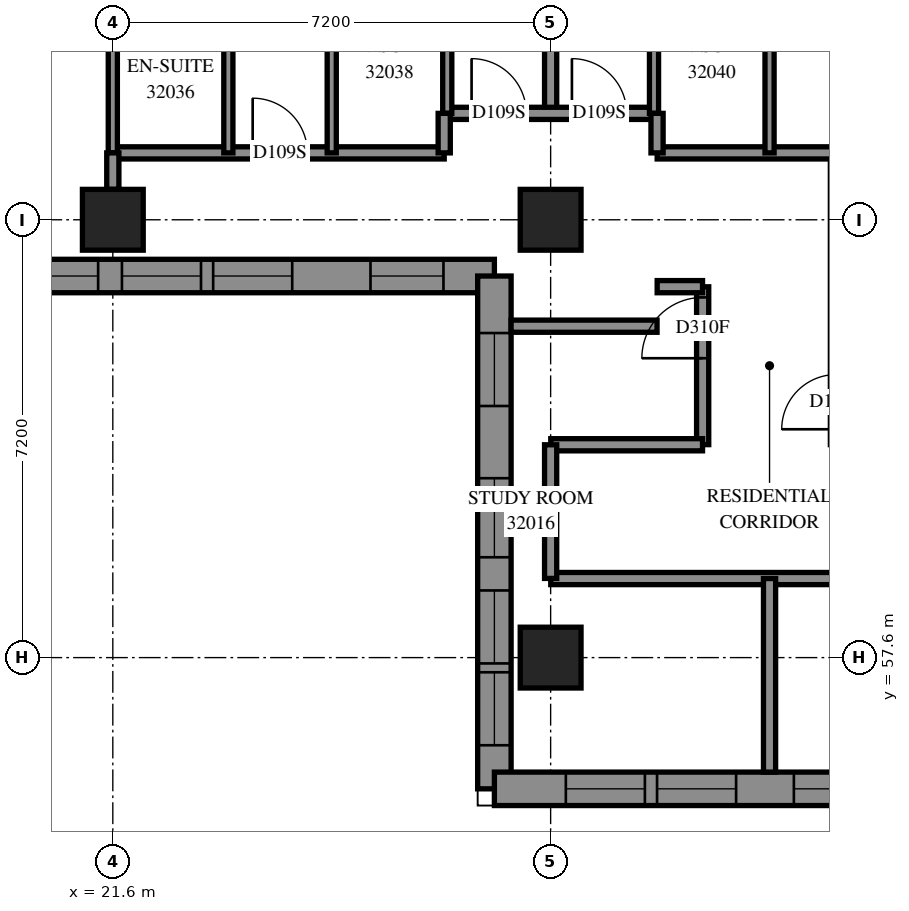
"""IFC4 building model, lengths in metres.
Left out: names, types, materials, properties, quantities, classifications, styles, units other than length and angle.
Written with IfcOpenShell. Run it as: python <this file> out.ifc"""

import sys

from ifc_helpers import new_model, si_unit, direction, frame, frame_2d, origin, origin_2d, place, context, subcontext, project, spatial, polyline, rectangle, outline, extrude, element, fill, save


model = new_model("IFC4")
c1 = context("Model", 3, precision=1e-05, world=origin(), true_north=direction((0.0, 1.0)))
c2 = subcontext(c1, "Body", "Model", "MODEL_VIEW")
j1 = project(units=[si_unit("LENGTHUNIT", "METRE"), si_unit("PLANEANGLEUNIT", "RADIAN")], contexts=[c1])
p1 = place(None, origin())
s1 = spatial("IfcSite", under=j1, at=p1, CompositionType="ELEMENT")
p2 = place(p1, origin())
s2 = spatial("IfcBuilding", under=s1, at=p2, CompositionType="ELEMENT")
p3 = place(p2, frame((0.0, 0.0, 118.6)))
s3 = spatial("IfcBuildingStorey", under=s2, at=p3, CompositionType="ELEMENT", Elevation=118.6)
for number, where, z_axis, x_axis in (
    (1, (21.6, 64.8, 0.0), (0.0, 0.0, 1.0), (1.0, 0.0, 0.0)),
    (2, (28.8, 57.6, 0.0), (0.0, 0.0, 1.0), (1.0, 0.0, 0.0)),
    (3, (28.8, 64.8, 0.0), (0.0, 0.0, 1.0), (1.0, 0.0, 0.0)),
):
    element("IfcColumn", number, at=place(p3, frame(where, z_axis=z_axis, x_axis=x_axis)), inside=s3, PredefinedType="COLUMN", context=c2, shape_type="SweptSolid", body=[
        extrude(rectangle(XDim=1.0, YDim=1.0, at=origin_2d()), origin(), (0.0, 0.0, 1.0), 3.1),
    ])
p4 = place(p3, frame((19.442, 63.875, 0.0), z_axis=(0.0, 0.0, 1.0), x_axis=(1.0, 0.0, 0.0)))
e4 = element("IfcWall", 4, at=p4, inside=s3, PredefinedType="SOLIDWALL", context=c2, shape_type="SweptSolid", body=[
    extrude(outline(polyline([(-0.275, -0.275), (8.158, -0.275), (8.708, 0.275), (0.275, 0.275), (-0.275, -0.275)])), origin(), (0.0, 0.0, 1.0), 3.1),
])
p5 = place(p4, frame((2.308, 0.0, 0.5)))
e5 = element("IfcOpeningElement", 5, at=p5, cuts=e4, PredefinedType="OPENING", context=c2, shape_type="SweptSolid", body=[
    extrude(rectangle(XDim=1.3, YDim=2.45, at=frame_2d((0.65, 1.225))), frame((0.0, 0.285, 0.0), z_axis=(0.0, -1.0, 0.0), x_axis=(1.0, 0.0, 0.0)), (0.0, 0.0, 1.0), 0.57),
])
p6 = place(p4, frame((3.808, 0.0, 0.5)))
e6 = element("IfcOpeningElement", 6, at=p6, cuts=e4, PredefinedType="OPENING", context=c2, shape_type="SweptSolid", body=[
    extrude(rectangle(XDim=1.3, YDim=2.45, at=frame_2d((0.65, 1.225))), frame((0.0, 0.285, 0.0), z_axis=(0.0, -1.0, 0.0), x_axis=(1.0, 0.0, 0.0)), (0.0, 0.0, 1.0), 0.57),
])
p7 = place(p4, frame((0.717, 0.0, 0.5)))
e7 = element("IfcOpeningElement", 7, at=p7, cuts=e4, PredefinedType="OPENING", context=c2, shape_type="SweptSolid", body=[
    extrude(rectangle(XDim=1.2, YDim=2.45, at=frame_2d((0.6, 1.225))), frame((0.0, 0.285, 0.0), z_axis=(0.0, -1.0, 0.0), x_axis=(1.0, 0.0, 0.0)), (0.0, 0.0, 1.0), 0.57),
])
p8 = place(p4, frame((6.396, 0.0, 0.5)))
e8 = element("IfcOpeningElement", 8, at=p8, cuts=e4, PredefinedType="OPENING", context=c2, shape_type="SweptSolid", body=[
    extrude(rectangle(XDim=1.2, YDim=2.45, at=frame_2d((0.6, 1.225))), frame((0.0, 0.285, 0.0), z_axis=(0.0, -1.0, 0.0), x_axis=(1.0, 0.0, 0.0)), (0.0, 0.0, 1.0), 0.57),
])
p9 = place(p3, frame((27.875, 63.875, 0.0), z_axis=(0.0, 0.0, 1.0), x_axis=(0.0, -1.0, 0.0)))
e9 = element("IfcWall", 9, at=p9, inside=s3, PredefinedType="SOLIDWALL", context=c2, shape_type="SweptSolid", body=[
    extrude(outline(polyline([(0.275, -0.275), (8.708, -0.275), (8.158, 0.275), (-0.275, 0.275), (0.275, -0.275)])), origin(), (0.0, 0.0, 1.0), 3.1),
])
p10 = place(p9, frame((3.325, 0.0, 0.5)))
e10 = element("IfcOpeningElement", 10, at=p10, cuts=e9, PredefinedType="OPENING", context=c2, shape_type="SweptSolid", body=[
    extrude(rectangle(XDim=1.3, YDim=2.45, at=frame_2d((0.65, 1.225))), frame((0.0, 0.285, 0.0), z_axis=(0.0, -1.0, 0.0), x_axis=(1.0, 0.0, 0.0)), (0.0, 0.0, 1.0), 0.57),
])
p11 = place(p9, frame((0.938, 0.0, 0.5)))
e11 = element("IfcOpeningElement", 11, at=p11, cuts=e9, PredefinedType="OPENING", context=c2, shape_type="SweptSolid", body=[
    extrude(rectangle(XDim=1.2, YDim=2.45, at=frame_2d((0.6, 1.225))), frame((0.0, 0.285, 0.0), z_axis=(0.0, -1.0, 0.0), x_axis=(1.0, 0.0, 0.0)), (0.0, 0.0, 1.0), 0.57),
])
p12 = place(p9, frame((6.516, 0.0, 0.5)))
e12 = element("IfcOpeningElement", 12, at=p12, cuts=e9, PredefinedType="OPENING", context=c2, shape_type="SweptSolid", body=[
    extrude(rectangle(XDim=1.2, YDim=2.45, at=frame_2d((0.6, 1.225))), frame((0.0, 0.285, 0.0), z_axis=(0.0, -1.0, 0.0), x_axis=(1.0, 0.0, 0.0)), (0.0, 0.0, 1.0), 0.57),
])
p13 = place(p9, frame((5.171, 0.0, 0.5)))
e13 = element("IfcOpeningElement", 13, at=p13, cuts=e9, PredefinedType="OPENING", context=c2, shape_type="SweptSolid", body=[
    extrude(rectangle(XDim=1.2, YDim=2.45, at=frame_2d((0.6, 1.225))), frame((0.0, 0.285, 0.0), z_axis=(0.0, -1.0, 0.0), x_axis=(1.0, 0.0, 0.0)), (0.0, 0.0, 1.0), 0.57),
])
p14 = place(p3, frame((27.875, 55.442, 0.0), z_axis=(0.0, 0.0, 1.0), x_axis=(1.0, 0.0, 0.0)))
e14 = element("IfcWall", 14, at=p14, inside=s3, PredefinedType="SOLIDWALL", context=c2, shape_type="SweptSolid", body=[
    extrude(outline(polyline([(-0.275, -0.275), (14.125, -0.275), (14.675, 0.275), (0.275, 0.275), (-0.275, -0.275)])), origin(), (0.0, 0.0, 1.0), 3.1),
])
p15 = place(p14, frame((1.175, 0.0, 0.5)))
e15 = element("IfcOpeningElement", 15, at=p15, cuts=e14, PredefinedType="OPENING", context=c2, shape_type="SweptSolid", body=[
    extrude(rectangle(XDim=1.3, YDim=2.45, at=frame_2d((0.65, 1.225))), frame((0.0, 0.285, 0.0), z_axis=(0.0, -1.0, 0.0), x_axis=(1.0, 0.0, 0.0)), (0.0, 0.0, 1.0), 0.57),
])
p16 = place(p14, frame((2.675, 0.0, 0.5)))
e16 = element("IfcOpeningElement", 16, at=p16, cuts=e14, PredefinedType="OPENING", context=c2, shape_type="SweptSolid", body=[
    extrude(rectangle(XDim=1.3, YDim=2.45, at=frame_2d((0.65, 1.225))), frame((0.0, 0.285, 0.0), z_axis=(0.0, -1.0, 0.0), x_axis=(1.0, 0.0, 0.0)), (0.0, 0.0, 1.0), 0.57),
])
p17 = place(p14, frame((4.925, 0.0, 0.5)))
e17 = element("IfcOpeningElement", 17, at=p17, cuts=e14, PredefinedType="OPENING", context=c2, shape_type="SweptSolid", body=[
    extrude(rectangle(XDim=1.3, YDim=2.45, at=frame_2d((0.65, 1.225))), frame((0.0, 0.285, 0.0), z_axis=(0.0, -1.0, 0.0), x_axis=(1.0, 0.0, 0.0)), (0.0, 0.0, 1.0), 0.57),
])
p18 = place(p14, frame((6.425, 0.0, 0.5)))
e18 = element("IfcOpeningElement", 18, at=p18, cuts=e14, PredefinedType="OPENING", context=c2, shape_type="SweptSolid", body=[
    extrude(rectangle(XDim=1.3, YDim=2.45, at=frame_2d((0.65, 1.225))), frame((0.0, 0.285, 0.0), z_axis=(0.0, -1.0, 0.0), x_axis=(1.0, 0.0, 0.0)), (0.0, 0.0, 1.0), 0.57),
])
p19 = place(p14, frame((8.275, 0.0, 0.5)))
e19 = element("IfcOpeningElement", 19, at=p19, cuts=e14, PredefinedType="OPENING", context=c2, shape_type="SweptSolid", body=[
    extrude(rectangle(XDim=1.3, YDim=2.45, at=frame_2d((0.65, 1.225))), frame((0.0, 0.285, 0.0), z_axis=(0.0, -1.0, 0.0), x_axis=(1.0, 0.0, 0.0)), (0.0, 0.0, 1.0), 0.57),
])
p20 = place(p14, frame((9.775, 0.0, 0.5)))
e20 = element("IfcOpeningElement", 20, at=p20, cuts=e14, PredefinedType="OPENING", context=c2, shape_type="SweptSolid", body=[
    extrude(rectangle(XDim=1.3, YDim=2.45, at=frame_2d((0.65, 1.225))), frame((0.0, 0.285, 0.0), z_axis=(0.0, -1.0, 0.0), x_axis=(1.0, 0.0, 0.0)), (0.0, 0.0, 1.0), 0.57),
])
p21 = place(p14, frame((12.363, 0.0, 0.5)))
e21 = element("IfcOpeningElement", 21, at=p21, cuts=e14, PredefinedType="OPENING", context=c2, shape_type="SweptSolid", body=[
    extrude(rectangle(XDim=1.2, YDim=2.45, at=frame_2d((0.6, 1.225))), frame((0.0, 0.285, 0.0), z_axis=(0.0, -1.0, 0.0), x_axis=(1.0, 0.0, 0.0)), (0.0, 0.0, 1.0), 0.57),
])
p22 = place(p3, frame((28.802, 58.9, 0.0), z_axis=(0.0, 0.0, 1.0), x_axis=(1.0, 0.0, 0.0)))
e22 = element("IfcWall", 22, at=p22, inside=s3, PredefinedType="PARTITIONING", context=c2, shape_type="SweptSolid", body=[
    extrude(rectangle(XDim=24.098, YDim=0.2, at=frame_2d((12.049, 0.0))), origin(), (0.0, 0.0, 1.0), 3.1),
])
p23 = place(p22, frame((11.323, 0.0, 0.0)))
e23 = element("IfcOpeningElement", 23, at=p23, cuts=e22, PredefinedType="OPENING", context=c2, shape_type="SweptSolid", body=[
    extrude(rectangle(XDim=1.0, YDim=2.1, at=frame_2d((0.5, 1.05))), frame((0.0, 0.11, 0.0), z_axis=(0.0, -1.0, 0.0), x_axis=(1.0, 0.0, 0.0)), (0.0, 0.0, 1.0), 0.22),
])
p24 = place(p22, frame((14.908, 0.0, 0.0)))
e24 = element("IfcOpeningElement", 24, at=p24, cuts=e22, PredefinedType="OPENING", context=c2, shape_type="SweptSolid", body=[
    extrude(rectangle(XDim=0.9, YDim=2.1, at=frame_2d((0.45, 1.05))), frame((0.0, 0.11, 0.0), z_axis=(0.0, -1.0, 0.0), x_axis=(1.0, 0.0, 0.0)), (0.0, 0.0, 1.0), 0.22),
])
p25 = place(p22, frame((18.523, 0.0, 0.0)))
e25 = element("IfcOpeningElement", 25, at=p25, cuts=e22, PredefinedType="OPENING", context=c2, shape_type="SweptSolid", body=[
    extrude(rectangle(XDim=1.0, YDim=2.1, at=frame_2d((0.5, 1.05))), frame((0.0, 0.11, 0.0), z_axis=(0.0, -1.0, 0.0), x_axis=(1.0, 0.0, 0.0)), (0.0, 0.0, 1.0), 0.22),
])
p26 = place(p22, frame((22.845, 0.0, 0.0)))
e26 = element("IfcOpeningElement", 26, at=p26, cuts=e22, PredefinedType="OPENING", context=c2, shape_type="SweptSolid", body=[
    extrude(rectangle(XDim=1.0, YDim=2.1, at=frame_2d((0.5, 1.05))), frame((0.0, 0.11, 0.0), z_axis=(0.0, -1.0, 0.0), x_axis=(1.0, 0.0, 0.0)), (0.0, 0.0, 1.0), 0.22),
])
p27 = place(p3, frame((21.6, 65.9, 0.0), z_axis=(0.0, 0.0, 1.0), x_axis=(1.0, 0.0, 0.0)))
e27 = element("IfcWall", 27, at=p27, inside=s3, PredefinedType="PARTITIONING", context=c2, shape_type="SweptSolid", body=[
    extrude(rectangle(XDim=5.45, YDim=0.2, at=frame_2d((2.725, 0.0))), origin(), (0.0, 0.0, 1.0), 3.1),
])
p28 = place(p27, frame((2.3, 0.0, 0.0)))
e28 = element("IfcOpeningElement", 28, at=p28, cuts=e27, PredefinedType="OPENING", context=c2, shape_type="SweptSolid", body=[
    extrude(rectangle(XDim=0.9, YDim=2.1, at=frame_2d((0.45, 1.05))), frame((0.0, 0.11, 0.0), z_axis=(0.0, -1.0, 0.0), x_axis=(1.0, 0.0, 0.0)), (0.0, 0.0, 1.0), 0.22),
])
p29 = place(p3, frame((28.8, 66.55, 0.0), z_axis=(0.0, 0.0, 1.0), x_axis=(0.0, 1.0, 0.0)))
e29 = element("IfcWall", 29, at=p29, inside=s3, PredefinedType="PARTITIONING", context=c2, shape_type="SweptSolid", body=[
    extrude(rectangle(XDim=4.95, YDim=0.2, at=frame_2d((2.475, 0.0))), origin(), (0.0, 0.0, 1.0), 3.1),
])
p30 = place(p3, frame((27.1, 66.55, 0.0), z_axis=(0.0, 0.0, 1.0), x_axis=(1.0, 0.0, 0.0)))
e30 = element("IfcWall", 30, at=p30, inside=s3, PredefinedType="PARTITIONING", context=c2, shape_type="SweptSolid", body=[
    extrude(rectangle(XDim=3.4, YDim=0.2, at=frame_2d((1.7, 0.0))), origin(), (0.0, 0.0, 1.0), 3.1),
])
p31 = place(p30, frame((0.4, 0.0, 0.0)))
e31 = element("IfcOpeningElement", 31, at=p31, cuts=e30, PredefinedType="OPENING", context=c2, shape_type="SweptSolid", body=[
    extrude(rectangle(XDim=0.9, YDim=2.1, at=frame_2d((0.45, 1.05))), frame((0.0, 0.11, 0.0), z_axis=(0.0, -1.0, 0.0), x_axis=(1.0, 0.0, 0.0)), (0.0, 0.0, 1.0), 0.22),
])
p32 = place(p30, frame((2.05, 0.0, 0.0)))
e32 = element("IfcOpeningElement", 32, at=p32, cuts=e30, PredefinedType="OPENING", context=c2, shape_type="SweptSolid", body=[
    extrude(rectangle(XDim=0.9, YDim=2.1, at=frame_2d((0.45, 1.05))), frame((0.0, 0.11, 0.0), z_axis=(0.0, -1.0, 0.0), x_axis=(1.0, 0.0, 0.0)), (0.0, 0.0, 1.0), 0.22),
])
p33 = place(p3, frame((32.4, 55.717, 0.0), z_axis=(0.0, 0.0, 1.0), x_axis=(0.0, 1.0, 0.0)))
e33 = element("IfcWall", 33, at=p33, inside=s3, PredefinedType="PARTITIONING", context=c2, shape_type="SweptSolid", body=[
    extrude(rectangle(XDim=3.183, YDim=0.2, at=frame_2d((1.591, 0.0))), origin(), (0.0, 0.0, 1.0), 3.1),
])
p34 = place(p3, frame((30.552, 65.9, 0.0), z_axis=(0.0, 0.0, 1.0), x_axis=(1.0, 0.0, 0.0)))
e34 = element("IfcWall", 34, at=p34, inside=s3, PredefinedType="PARTITIONING", context=c2, shape_type="SweptSolid", body=[
    extrude(rectangle(XDim=2.948, YDim=0.2, at=frame_2d((1.474, 0.0))), origin(), (0.0, 0.0, 1.0), 3.1),
])
p35 = place(p3, frame((31.3, 61.102, 0.0), z_axis=(0.0, 0.0, 1.0), x_axis=(0.0, 1.0, 0.0)))
e35 = element("IfcWall", 35, at=p35, inside=s3, PredefinedType="PARTITIONING", context=c2, shape_type="SweptSolid", body=[
    extrude(rectangle(XDim=2.596, YDim=0.2, at=frame_2d((1.298, 0.0))), origin(), (0.0, 0.0, 1.0), 3.1),
])
p36 = place(p35, frame((1.421, 0.0, 0.0)))
e36 = element("IfcOpeningElement", 36, at=p36, cuts=e35, PredefinedType="OPENING", context=c2, shape_type="SweptSolid", body=[
    extrude(rectangle(XDim=1.0, YDim=2.1, at=frame_2d((0.5, 1.05))), frame((0.0, 0.11, 0.0), z_axis=(0.0, -1.0, 0.0), x_axis=(1.0, 0.0, 0.0)), (0.0, 0.0, 1.0), 0.22),
])
p37 = place(p3, frame((28.802, 61.1, 0.0), z_axis=(0.0, 0.0, 1.0), x_axis=(1.0, 0.0, 0.0)))
e37 = element("IfcWall", 37, at=p37, inside=s3, PredefinedType="PARTITIONING", context=c2, shape_type="SweptSolid", body=[
    extrude(rectangle(XDim=2.496, YDim=0.2, at=frame_2d((1.248, 0.0))), origin(), (0.0, 0.0, 1.0), 3.1),
])
p38 = place(p3, frame((21.6, 65.9, 0.0), z_axis=(0.0, 0.0, 1.0), x_axis=(0.0, 1.0, 0.0)))
e38 = element("IfcWall", 38, at=p38, inside=s3, PredefinedType="PARTITIONING", context=c2, shape_type="SweptSolid", body=[
    extrude(rectangle(XDim=2.4, YDim=0.15, at=frame_2d((1.2, 0.0))), origin(), (0.0, 0.0, 1.0), 2.6),
])
for number, where, z_axis, x_axis in (
    (39, (23.5, 65.9, 0.0), (0.0, 0.0, 1.0), (0.0, 1.0, 0.0)),
    (40, (25.2, 65.9, 0.0), (0.0, 0.0, 1.0), (0.0, 1.0, 0.0)),
    (41, (32.4, 65.9, 0.0), (0.0, 0.0, 1.0), (0.0, 1.0, 0.0)),
):
    element("IfcWall", number, at=place(p3, frame(where, z_axis=z_axis, x_axis=x_axis)), inside=s3, PredefinedType="PARTITIONING", context=c2, shape_type="SweptSolid", body=[
        extrude(rectangle(XDim=2.4, YDim=0.15, at=frame_2d((1.2, 0.0))), origin(), (0.0, 0.0, 1.0), 3.1),
    ])
p39 = place(p3, frame((28.15, 63.05, 0.0), z_axis=(0.0, 0.0, 1.0), x_axis=(1.0, 0.0, 0.0)))
e42 = element("IfcWall", 42, at=p39, inside=s3, PredefinedType="PARTITIONING", context=c2, shape_type="SweptSolid", body=[
    extrude(rectangle(XDim=2.4, YDim=0.2, at=frame_2d((1.2, 0.0))), origin(), (0.0, 0.0, 1.0), 3.1),
])
p40 = place(p3, frame((28.8, 58.902, 0.0), z_axis=(0.0, 0.0, 1.0), x_axis=(0.0, 1.0, 0.0)))
e43 = element("IfcWall", 43, at=p40, inside=s3, PredefinedType="PARTITIONING", context=c2, shape_type="SweptSolid", body=[
    extrude(rectangle(XDim=2.198, YDim=0.2, at=frame_2d((1.099, 0.0))), origin(), (0.0, 0.0, 1.0), 2.6),
])
for number, where, z_axis, x_axis in (
    (44, (27.1, 66.55, 0.0), (0.0, 0.0, 1.0), (0.0, 1.0, 0.0)),
    (45, (30.5, 66.55, 0.0), (0.0, 0.0, 1.0), (0.0, 1.0, 0.0)),
):
    element("IfcWall", number, at=place(p3, frame(where, z_axis=z_axis, x_axis=x_axis)), inside=s3, PredefinedType="PARTITIONING", context=c2, shape_type="SweptSolid", body=[
        extrude(rectangle(XDim=1.75, YDim=0.15, at=frame_2d((0.875, 0.0))), origin(), (0.0, 0.0, 1.0), 3.1),
    ])
p41 = place(p3, frame((30.552, 63.7, 0.0), z_axis=(0.0, 0.0, 1.0), x_axis=(1.0, 0.0, 0.0)))
e46 = element("IfcWall", 46, at=p41, inside=s3, PredefinedType="PARTITIONING", context=c2, shape_type="SweptSolid", body=[
    extrude(rectangle(XDim=0.746, YDim=0.2, at=frame_2d((0.373, 0.0))), origin(), (0.0, 0.0, 1.0), 3.1),
])
for number, where, z_axis, x_axis in (
    (47, (27.05, 65.9, 0.0), (0.0, 0.0, 1.0), (0.0, 1.0, 0.0)),
    (48, (30.55, 65.9, 0.0), (0.0, 0.0, 1.0), (0.0, 1.0, 0.0)),
):
    element("IfcWall", number, at=place(p3, frame(where, z_axis=z_axis, x_axis=x_axis)), inside=s3, PredefinedType="PARTITIONING", context=c2, shape_type="SweptSolid", body=[
        extrude(rectangle(XDim=0.65, YDim=0.2, at=frame_2d((0.325, 0.0))), origin(), (0.0, 0.0, 1.0), 3.1),
    ])
p42 = place(p3, frame((21.6, 65.3, 0.0), z_axis=(0.0, 0.0, 1.0), x_axis=(0.0, 1.0, 0.0)))
e49 = element("IfcWall", 49, at=p42, inside=s3, PredefinedType="PARTITIONING", context=c2, shape_type="SweptSolid", body=[
    extrude(rectangle(XDim=0.6, YDim=0.2, at=frame_2d((0.3, 0.0))), origin(), (0.0, 0.0, 1.0), 2.6),
])
p43 = place(p5, origin())
e50 = element("IfcWindow", 50, at=p43, inside=s3, PartitioningType="SINGLE_PANEL", PredefinedType="WINDOW", context=c2, shape_type="SweptSolid", body=[
    extrude(rectangle(XDim=1.3, YDim=2.45, at=frame_2d((0.65, 1.225))), frame((0.0, 0.155, 0.0), z_axis=(0.0, -1.0, 0.0), x_axis=(1.0, 0.0, 0.0)), (0.0, 0.0, 1.0), 0.06),
])
fill(e5, e50)
p44 = place(p6, origin())
e51 = element("IfcWindow", 51, at=p44, inside=s3, PartitioningType="SINGLE_PANEL", PredefinedType="WINDOW", context=c2, shape_type="SweptSolid", body=[
    extrude(rectangle(XDim=1.3, YDim=2.45, at=frame_2d((0.65, 1.225))), frame((0.0, 0.155, 0.0), z_axis=(0.0, -1.0, 0.0), x_axis=(1.0, 0.0, 0.0)), (0.0, 0.0, 1.0), 0.06),
])
fill(e6, e51)
p45 = place(p7, origin())
e52 = element("IfcWindow", 52, at=p45, inside=s3, PartitioningType="SINGLE_PANEL", PredefinedType="WINDOW", context=c2, shape_type="SweptSolid", body=[
    extrude(rectangle(XDim=1.2, YDim=2.45, at=frame_2d((0.6, 1.225))), frame((0.0, 0.155, 0.0), z_axis=(0.0, -1.0, 0.0), x_axis=(1.0, 0.0, 0.0)), (0.0, 0.0, 1.0), 0.06),
])
fill(e7, e52)
p46 = place(p8, origin())
e53 = element("IfcWindow", 53, at=p46, inside=s3, PartitioningType="SINGLE_PANEL", PredefinedType="WINDOW", context=c2, shape_type="SweptSolid", body=[
    extrude(rectangle(XDim=1.2, YDim=2.45, at=frame_2d((0.6, 1.225))), frame((0.0, 0.155, 0.0), z_axis=(0.0, -1.0, 0.0), x_axis=(1.0, 0.0, 0.0)), (0.0, 0.0, 1.0), 0.06),
])
fill(e8, e53)
p47 = place(p10, origin())
e54 = element("IfcWindow", 54, at=p47, inside=s3, PartitioningType="SINGLE_PANEL", PredefinedType="WINDOW", context=c2, shape_type="SweptSolid", body=[
    extrude(rectangle(XDim=1.3, YDim=2.45, at=frame_2d((0.65, 1.225))), frame((0.0, 0.155, 0.0), z_axis=(0.0, -1.0, 0.0), x_axis=(1.0, 0.0, 0.0)), (0.0, 0.0, 1.0), 0.06),
])
fill(e10, e54)
p48 = place(p11, origin())
e55 = element("IfcWindow", 55, at=p48, inside=s3, PartitioningType="SINGLE_PANEL", PredefinedType="WINDOW", context=c2, shape_type="SweptSolid", body=[
    extrude(rectangle(XDim=1.2, YDim=2.45, at=frame_2d((0.6, 1.225))), frame((0.0, 0.155, 0.0), z_axis=(0.0, -1.0, 0.0), x_axis=(1.0, 0.0, 0.0)), (0.0, 0.0, 1.0), 0.06),
])
fill(e11, e55)
p49 = place(p12, origin())
e56 = element("IfcWindow", 56, at=p49, inside=s3, PartitioningType="SINGLE_PANEL", PredefinedType="WINDOW", context=c2, shape_type="SweptSolid", body=[
    extrude(rectangle(XDim=1.2, YDim=2.45, at=frame_2d((0.6, 1.225))), frame((0.0, 0.155, 0.0), z_axis=(0.0, -1.0, 0.0), x_axis=(1.0, 0.0, 0.0)), (0.0, 0.0, 1.0), 0.06),
])
fill(e12, e56)
p50 = place(p15, origin())
e57 = element("IfcWindow", 57, at=p50, inside=s3, PartitioningType="SINGLE_PANEL", PredefinedType="WINDOW", context=c2, shape_type="SweptSolid", body=[
    extrude(rectangle(XDim=1.3, YDim=2.45, at=frame_2d((0.65, 1.225))), frame((0.0, 0.155, 0.0), z_axis=(0.0, -1.0, 0.0), x_axis=(1.0, 0.0, 0.0)), (0.0, 0.0, 1.0), 0.06),
])
fill(e15, e57)
p51 = place(p16, origin())
e58 = element("IfcWindow", 58, at=p51, inside=s3, PartitioningType="SINGLE_PANEL", PredefinedType="WINDOW", context=c2, shape_type="SweptSolid", body=[
    extrude(rectangle(XDim=1.3, YDim=2.45, at=frame_2d((0.65, 1.225))), frame((0.0, 0.155, 0.0), z_axis=(0.0, -1.0, 0.0), x_axis=(1.0, 0.0, 0.0)), (0.0, 0.0, 1.0), 0.06),
])
fill(e16, e58)
p52 = place(p17, origin())
e59 = element("IfcWindow", 59, at=p52, inside=s3, PartitioningType="SINGLE_PANEL", PredefinedType="WINDOW", context=c2, shape_type="SweptSolid", body=[
    extrude(rectangle(XDim=1.3, YDim=2.45, at=frame_2d((0.65, 1.225))), frame((0.0, 0.155, 0.0), z_axis=(0.0, -1.0, 0.0), x_axis=(1.0, 0.0, 0.0)), (0.0, 0.0, 1.0), 0.06),
])
fill(e17, e59)
p53 = place(p36, origin())
e60 = element("IfcDoor", 60, at=p53, inside=s3, OperationType="SINGLE_SWING_LEFT", PredefinedType="DOOR", context=c2, shape_type="SweptSolid", body=[
    extrude(rectangle(XDim=1.0, YDim=2.1, at=frame_2d((0.5, 1.05))), frame((0.0, 0.025, 0.0), z_axis=(0.0, -1.0, 0.0), x_axis=(1.0, 0.0, 0.0)), (0.0, 0.0, 1.0), 0.05),
])
fill(e36, e60)
p54 = place(p28, origin())
e61 = element("IfcDoor", 61, at=p54, inside=s3, OperationType="SINGLE_SWING_RIGHT", PredefinedType="DOOR", context=c2, shape_type="SweptSolid", body=[
    extrude(rectangle(XDim=0.9, YDim=2.1, at=frame_2d((0.45, 1.05))), frame((0.0, 0.025, 0.0), z_axis=(0.0, -1.0, 0.0), x_axis=(1.0, 0.0, 0.0)), (0.0, 0.0, 1.0), 0.05),
])
fill(e28, e61)
p55 = place(p31, origin())
e62 = element("IfcDoor", 62, at=p55, inside=s3, OperationType="SINGLE_SWING_LEFT", PredefinedType="DOOR", context=c2, shape_type="SweptSolid", body=[
    extrude(rectangle(XDim=0.9, YDim=2.1, at=frame_2d((0.45, 1.05))), frame((0.0, 0.025, 0.0), z_axis=(0.0, -1.0, 0.0), x_axis=(1.0, 0.0, 0.0)), (0.0, 0.0, 1.0), 0.05),
])
fill(e31, e62)
p56 = place(p32, origin())
e63 = element("IfcDoor", 63, at=p56, inside=s3, OperationType="SINGLE_SWING_RIGHT", PredefinedType="DOOR", context=c2, shape_type="SweptSolid", body=[
    extrude(rectangle(XDim=0.9, YDim=2.1, at=frame_2d((0.45, 1.05))), frame((0.0, 0.025, 0.0), z_axis=(0.0, -1.0, 0.0), x_axis=(1.0, 0.0, 0.0)), (0.0, 0.0, 1.0), 0.05),
])
fill(e32, e63)
p57 = place(p13, origin())
e64 = element("IfcWindow", 64, at=p57, inside=s3, PartitioningType="SINGLE_PANEL", PredefinedType="WINDOW", context=c2, shape_type="SweptSolid", body=[
    extrude(rectangle(XDim=1.2, YDim=2.45, at=frame_2d((0.6, 1.225))), frame((0.0, 0.155, 0.0), z_axis=(0.0, -1.0, 0.0), x_axis=(1.0, 0.0, 0.0)), (0.0, 0.0, 1.0), 0.06),
])
fill(e13, e64)
save(model, sys.argv[1])
